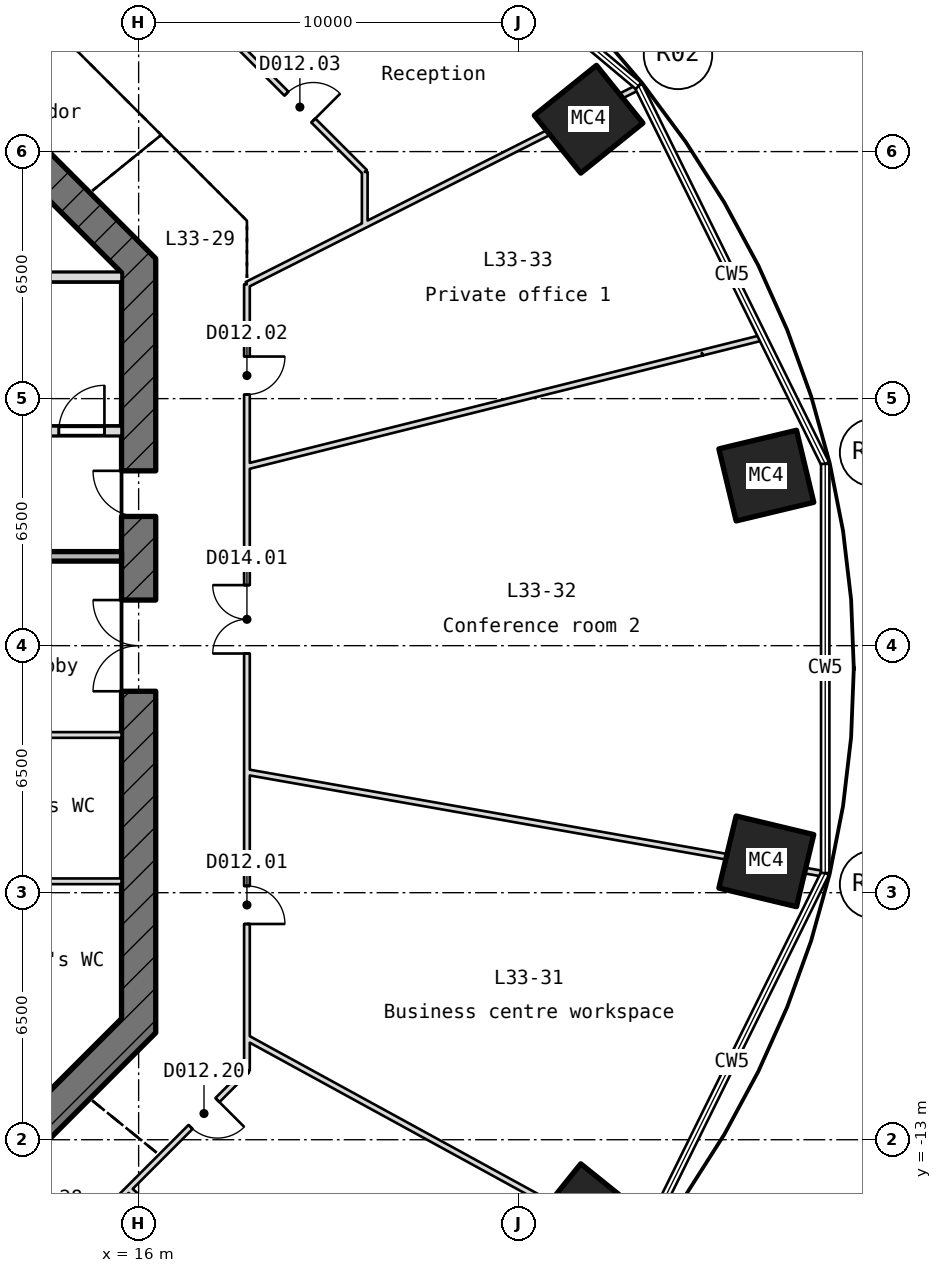
"""IFC4 building model, lengths in metres.
Left out: names, types, materials, properties, quantities, classifications, styles, units other than length and angle.
Written with IfcOpenShell. Run it as: python <this file> out.ifc"""

import sys

from ifc_helpers import new_model, si_unit, direction, frame, frame_2d, origin, origin_2d, place, context, subcontext, project, spatial, rectangle, hollow_rectangle, extrude, element, fill, save


model = new_model("IFC4")
c1 = context("Model", 3, precision=1e-05, world=origin(), true_north=direction((0.0, 1.0)))
c2 = subcontext(c1, "Body", "Model", "MODEL_VIEW")
j1 = project(units=[si_unit("LENGTHUNIT", "METRE"), si_unit("PLANEANGLEUNIT", "RADIAN")], contexts=[c1])
p1 = place(None, origin())
s1 = spatial("IfcSite", under=j1, at=p1, CompositionType="ELEMENT")
p2 = place(p1, origin())
s2 = spatial("IfcBuilding", under=s1, at=p2, CompositionType="ELEMENT")
p3 = place(p2, frame((0.0, 0.0, 155.65)))
s3 = spatial("IfcBuildingStorey", under=s2, at=p3, CompositionType="ELEMENT", Elevation=155.65)
for number, where, z_axis, x_axis in (
    (1, (32.517, 4.475, -0.25), (0.0, 0.0, 1.0), (0.233, -0.972, 0.0)),
    (2, (27.841, 13.852, -0.25), (0.0, 0.0, 1.0), (0.627, -0.779, 0.0)),
    (3, (27.841, -15.052, -0.25), (0.0, 0.0, 1.0), (-0.627, -0.779, 0.0)),
    (4, (32.517, -5.675, -0.25), (0.0, 0.0, 1.0), (-0.233, -0.972, 0.0)),
):
    element("IfcColumn", number, at=place(p3, frame(where, z_axis=z_axis, x_axis=x_axis)), inside=s3, PredefinedType="COLUMN", context=c2, shape_type="SweptSolid", body=[
        extrude(hollow_rectangle(XDim=1.95, YDim=2.1, WallThickness=0.075, at=origin_2d()), origin(), (0.0, 0.0, 1.0), 5.47),
    ])
p4 = place(p3, frame((12.868, -13.132, -0.25), z_axis=(0.0, 0.0, 1.0), x_axis=(0.707106781187, 0.707106781187, 0.0)))
e5 = element("IfcWall", 5, at=p4, inside=s3, PredefinedType="SHEAR", context=c2, shape_type="SweptSolid", body=[
    extrude(rectangle(XDim=4.615, YDim=0.9, at=frame_2d((2.308, 0.0))), origin(), (0.0, 0.0, 1.0), 5.47),
])
p5 = place(p3, frame((16.0, -10.186, -0.25), z_axis=(0.0, 0.0, 1.0), x_axis=(0.0, 1.0, 0.0)))
e6 = element("IfcWall", 6, at=p5, inside=s3, PredefinedType="SHEAR", context=c2, shape_type="SweptSolid", body=[
    extrude(rectangle(XDim=20.373, YDim=0.9, at=frame_2d((10.186, 0.0))), origin(), (0.0, 0.0, 1.0), 5.47),
])
p6 = place(p5, frame((8.986, 0.0, 0.25)))
e7 = element("IfcOpeningElement", 7, at=p6, cuts=e6, PredefinedType="OPENING", context=c2, shape_type="SweptSolid", body=[
    extrude(rectangle(XDim=2.4, YDim=2.1, at=frame_2d((1.2, 1.05))), frame((0.0, 0.46, 0.0), z_axis=(0.0, -1.0, 0.0), x_axis=(1.0, 0.0, 0.0)), (0.0, 0.0, 1.0), 0.92),
])
p7 = place(p5, frame((13.586, 0.0, 0.25)))
e8 = element("IfcOpeningElement", 8, at=p7, cuts=e6, PredefinedType="OPENING", context=c2, shape_type="SweptSolid", body=[
    extrude(rectangle(XDim=1.2, YDim=2.1, at=frame_2d((0.6, 1.05))), frame((0.0, 0.46, 0.0), z_axis=(0.0, -1.0, 0.0), x_axis=(1.0, 0.0, 0.0)), (0.0, 0.0, 1.0), 0.92),
])
p8 = place(p3, frame((16.132, 9.868, -0.25), z_axis=(0.0, 0.0, 1.0), x_axis=(-0.707106781187, 0.707106781187, 0.0)))
e9 = element("IfcWall", 9, at=p8, inside=s3, PredefinedType="SHEAR", context=c2, shape_type="SweptSolid", body=[
    extrude(rectangle(XDim=4.615, YDim=0.9, at=frame_2d((2.308, 0.0))), origin(), (0.0, 0.0, 1.0), 5.47),
])
p9 = place(p3, frame((10.975, -6.2, 0.0), z_axis=(0.0, 0.0, 1.0), x_axis=(1.0, 0.0, 0.0)))
e10 = element("IfcWall", 10, at=p9, inside=s3, PredefinedType="PARTITIONING", context=c2, shape_type="SweptSolid", body=[
    extrude(rectangle(XDim=4.575, YDim=0.15, at=frame_2d((2.288, 0.0))), origin(), (0.0, 0.0, 1.0), 5.22),
])
p10 = place(p3, frame((8.4, -2.35, 0.0), z_axis=(0.0, 0.0, 1.0), x_axis=(1.0, 0.0, 0.0)))
e11 = element("IfcWall", 11, at=p10, inside=s3, PredefinedType="PARTITIONING", context=c2, shape_type="SweptSolid", body=[
    extrude(rectangle(XDim=7.15, YDim=0.15, at=frame_2d((3.575, 0.0))), origin(), (0.0, 0.0, 1.0), 5.22),
])
p11 = place(p3, frame((8.4, 2.35, 0.0), z_axis=(0.0, 0.0, 1.0), x_axis=(1.0, 0.0, 0.0)))
e12 = element("IfcWall", 12, at=p11, inside=s3, PredefinedType="STANDARD", context=c2, shape_type="SweptSolid", body=[
    extrude(rectangle(XDim=7.15, YDim=0.25, at=frame_2d((3.575, 0.0))), origin(), (0.0, 0.0, 1.0), 5.22),
])
p12 = place(p3, frame((8.55, 5.65, -0.25), z_axis=(0.0, 0.0, 1.0), x_axis=(1.0, 0.0, 0.0)))
e13 = element("IfcWall", 13, at=p12, inside=s3, PredefinedType="SHEAR", context=c2, shape_type="SweptSolid", body=[
    extrude(rectangle(XDim=7.0, YDim=0.25, at=frame_2d((3.5, 0.0))), origin(), (0.0, 0.0, 1.0), 5.47),
])
p13 = place(p12, frame((5.35, 0.0, 0.25)))
e14 = element("IfcOpeningElement", 14, at=p13, cuts=e13, PredefinedType="OPENING", context=c2, shape_type="SweptSolid", body=[
    extrude(rectangle(XDim=1.2, YDim=2.1, at=frame_2d((0.6, 1.05))), frame((0.0, 0.135, 0.0), z_axis=(0.0, -1.0, 0.0), x_axis=(1.0, 0.0, 0.0)), (0.0, 0.0, 1.0), 0.27),
])
p14 = place(p3, frame((8.55, 9.7, -0.25), z_axis=(0.0, 0.0, 1.0), x_axis=(1.0, 0.0, 0.0)))
e15 = element("IfcWall", 15, at=p14, inside=s3, PredefinedType="SHEAR", context=c2, shape_type="SweptSolid", body=[
    extrude(rectangle(XDim=7.0, YDim=0.25, at=frame_2d((3.5, 0.0))), origin(), (0.0, 0.0, 1.0), 5.47),
])
p15 = place(p3, frame((18.85, 4.713, 0.0), z_axis=(0.0, 0.0, 1.0), x_axis=(0.970133188506, 0.242572868557, 0.0)))
e16 = element("IfcWall", 16, at=p15, inside=s3, PredefinedType="PARTITIONING", context=c2, shape_type="SweptSolid", body=[
    extrude(rectangle(XDim=12.339, YDim=0.15, at=frame_2d((6.17, 0.0))), origin(), (0.0, 0.0, 1.0), 4.608),
])
p16 = place(p3, frame((30.821, 7.706, 0.0), z_axis=(0.0, 0.0, 1.0), x_axis=(0.97015129404, 0.242500446746, 0.0)))
e17 = element("IfcWall", 17, at=p16, inside=s3, PredefinedType="PARTITIONING", context=c2, shape_type="SweptSolid", body=[
    extrude(rectangle(XDim=1.633, YDim=0.15, at=frame_2d((0.816, 0.0))), origin(), (0.0, 0.0, 1.0), 5.22),
])
p17 = place(p3, frame((18.85, 9.502, 0.0), z_axis=(0.0, 0.0, 1.0), x_axis=(0.892969898895, 0.450116384579, 0.0)))
e18 = element("IfcWall", 18, at=p17, inside=s3, PredefinedType="PARTITIONING", context=c2, shape_type="SweptSolid", body=[
    extrude(rectangle(XDim=9.412, YDim=0.15, at=frame_2d((4.706, 0.0))), origin(), (0.0, 0.0, 1.0), 4.608),
])
p18 = place(p3, frame((27.255, 13.738, 0.0), z_axis=(0.0, 0.0, 1.0), x_axis=(0.892996055484, 0.4500644897, 0.0)))
e19 = element("IfcWall", 19, at=p18, inside=s3, PredefinedType="PARTITIONING", context=c2, shape_type="SweptSolid", body=[
    extrude(rectangle(XDim=2.122, YDim=0.15, at=frame_2d((1.061, 0.0))), origin(), (0.0, 0.0, 1.0), 5.22),
])
p19 = place(p3, frame((14.18, -15.85, 0.0), z_axis=(0.0, 0.0, 1.0), x_axis=(0.707106781187, 0.707106781187, 0.0)))
e20 = element("IfcWall", 20, at=p19, inside=s3, PredefinedType="PARTITIONING", context=c2, shape_type="SweptSolid", body=[
    extrude(rectangle(XDim=6.604, YDim=0.15, at=frame_2d((3.302, 0.0))), origin(), (0.0, 0.0, 1.0), 5.22),
])
p20 = place(p19, frame((4.506, 0.0, 0.0)))
e21 = element("IfcOpeningElement", 21, at=p20, cuts=e20, PredefinedType="OPENING", context=c2, shape_type="SweptSolid", body=[
    extrude(rectangle(XDim=1.0, YDim=2.1, at=frame_2d((0.5, 1.05))), frame((0.0, 0.085, 0.0), z_axis=(0.0, -1.0, 0.0), x_axis=(1.0, 0.0, 0.0)), (0.0, 0.0, 1.0), 0.17),
])
p21 = place(p3, frame((21.95, 11.064, 0.0), z_axis=(0.0, 0.0, 1.0), x_axis=(0.0, 1.0, 0.0)))
e22 = element("IfcWall", 22, at=p21, inside=s3, PredefinedType="PARTITIONING", context=c2, shape_type="SweptSolid", body=[
    extrude(rectangle(XDim=1.4, YDim=0.15, at=frame_2d((0.7, 0.0))), origin(), (0.0, 0.0, 1.0), 5.22),
])
p22 = place(p3, frame((18.85, -11.18, 0.0), z_axis=(0.0, 0.0, 1.0), x_axis=(0.0, 1.0, 0.0)))
e23 = element("IfcWall", 23, at=p22, inside=s3, PredefinedType="PARTITIONING", context=c2, shape_type="SweptSolid", body=[
    extrude(rectangle(XDim=20.688, YDim=0.15, at=frame_2d((10.344, 0.0))), origin(), (0.0, 0.0, 1.0), 5.22),
])
p23 = place(p22, frame((3.857, 0.0, 0.0)))
e24 = element("IfcOpeningElement", 24, at=p23, cuts=e23, PredefinedType="OPENING", context=c2, shape_type="SweptSolid", body=[
    extrude(rectangle(XDim=1.0, YDim=2.1, at=frame_2d((0.5, 1.05))), frame((0.0, 0.085, 0.0), z_axis=(0.0, -1.0, 0.0), x_axis=(1.0, 0.0, 0.0)), (0.0, 0.0, 1.0), 0.17),
])
p24 = place(p22, frame((10.974, 0.0, 0.0)))
e25 = element("IfcOpeningElement", 25, at=p24, cuts=e23, PredefinedType="OPENING", context=c2, shape_type="SweptSolid", body=[
    extrude(rectangle(XDim=1.8, YDim=2.1, at=frame_2d((0.9, 1.05))), frame((0.0, 0.085, 0.0), z_axis=(0.0, -1.0, 0.0), x_axis=(1.0, 0.0, 0.0)), (0.0, 0.0, 1.0), 0.17),
])
p25 = place(p22, frame((17.788, 0.0, 0.0)))
e26 = element("IfcOpeningElement", 26, at=p25, cuts=e23, PredefinedType="OPENING", context=c2, shape_type="SweptSolid", body=[
    extrude(rectangle(XDim=1.0, YDim=2.1, at=frame_2d((0.5, 1.05))), frame((0.0, 0.085, 0.0), z_axis=(0.0, -1.0, 0.0), x_axis=(1.0, 0.0, 0.0)), (0.0, 0.0, 1.0), 0.17),
])
p26 = place(p3, frame((21.95, 12.465, 0.0), z_axis=(0.0, 0.0, 1.0), x_axis=(-0.707106781187, 0.707106781187, 0.0)))
e27 = element("IfcWall", 27, at=p26, inside=s3, PredefinedType="PARTITIONING", context=c2, shape_type="SweptSolid", body=[
    extrude(rectangle(XDim=9.172, YDim=0.15, at=frame_2d((4.586, 0.0))), origin(), (0.0, 0.0, 1.0), 5.22),
])
p27 = place(p26, frame((1.914, 0.0, 0.0)))
e28 = element("IfcOpeningElement", 28, at=p27, cuts=e27, PredefinedType="OPENING", context=c2, shape_type="SweptSolid", body=[
    extrude(rectangle(XDim=1.0, YDim=2.1, at=frame_2d((0.5, 1.05))), frame((0.0, 0.085, 0.0), z_axis=(0.0, -1.0, 0.0), x_axis=(1.0, 0.0, 0.0)), (0.0, 0.0, 1.0), 0.17),
])
p28 = place(p26, frame((6.5, 0.0, 0.0)))
e29 = element("IfcOpeningElement", 29, at=p28, cuts=e27, PredefinedType="OPENING", context=c2, shape_type="SweptSolid", body=[
    extrude(rectangle(XDim=1.0, YDim=2.1, at=frame_2d((0.5, 1.05))), frame((0.0, 0.085, 0.0), z_axis=(0.0, -1.0, 0.0), x_axis=(1.0, 0.0, 0.0)), (0.0, 0.0, 1.0), 0.17),
])
p29 = place(p3, frame((23.096, -20.984, 0.0), z_axis=(0.0, 0.0, 1.0), x_axis=(-0.740122200338, 0.672472399856, 0.0)))
e30 = element("IfcWall", 30, at=p29, inside=s3, PredefinedType="PARTITIONING", context=c2, shape_type="SweptSolid", body=[
    extrude(rectangle(XDim=9.946, YDim=0.15, at=frame_2d((4.973, 0.0))), origin(), (0.0, 0.0, 1.0), 5.22),
])
p30 = place(p3, frame((27.263, -14.926, 0.0), z_axis=(0.0, 0.0, 1.0), x_axis=(-0.877149368701, 0.480217643352, 0.0)))
e31 = element("IfcWall", 31, at=p30, inside=s3, PredefinedType="PARTITIONING", context=c2, shape_type="SweptSolid", body=[
    extrude(rectangle(XDim=9.591, YDim=0.15, at=frame_2d((4.796, 0.0))), origin(), (0.0, 0.0, 1.0), 4.608),
])
p31 = place(p3, frame((34.033, -6.006, 0.0), z_axis=(0.0, 0.0, 1.0), x_axis=(-0.984792910243, 0.173732334166, 0.0)))
e32 = element("IfcWall", 32, at=p31, inside=s3, PredefinedType="PARTITIONING", context=c2, shape_type="SweptSolid", body=[
    extrude(rectangle(XDim=2.102, YDim=0.15, at=frame_2d((1.051, 0.0))), origin(), (0.0, 0.0, 1.0), 5.22),
])
p32 = place(p3, frame((31.963, -5.641, 0.0), z_axis=(0.0, 0.0, 1.0), x_axis=(-0.984781159157, 0.17379893144, 0.0)))
e33 = element("IfcWall", 33, at=p32, inside=s3, PredefinedType="PARTITIONING", context=c2, shape_type="SweptSolid", body=[
    extrude(rectangle(XDim=13.315, YDim=0.15, at=frame_2d((6.658, 0.0))), origin(), (0.0, 0.0, 1.0), 4.527),
])
p33 = place(p13, origin())
e34 = element("IfcDoor", 34, at=p33, inside=s3, OperationType="SINGLE_SWING_RIGHT", PredefinedType="DOOR", context=c2, shape_type="SweptSolid", body=[
    extrude(rectangle(XDim=1.2, YDim=2.1, at=frame_2d((0.6, 1.05))), frame((0.0, 0.025, 0.0), z_axis=(0.0, -1.0, 0.0), x_axis=(1.0, 0.0, 0.0)), (0.0, 0.0, 1.0), 0.05),
])
fill(e14, e34)
p34 = place(p6, origin())
e35 = element("IfcDoor", 35, at=p34, inside=s3, OperationType="DOUBLE_DOOR_SINGLE_SWING", PredefinedType="DOOR", context=c2, shape_type="SweptSolid", body=[
    extrude(rectangle(XDim=2.4, YDim=2.1, at=frame_2d((1.2, 1.05))), frame((0.0, 0.025, 0.0), z_axis=(0.0, -1.0, 0.0), x_axis=(1.0, 0.0, 0.0)), (0.0, 0.0, 1.0), 0.05),
])
fill(e7, e35)
p35 = place(p7, origin())
e36 = element("IfcDoor", 36, at=p35, inside=s3, OperationType="SINGLE_SWING_RIGHT", PredefinedType="DOOR", context=c2, shape_type="SweptSolid", body=[
    extrude(rectangle(XDim=1.2, YDim=2.1, at=frame_2d((0.6, 1.05))), frame((0.0, 0.025, 0.0), z_axis=(0.0, -1.0, 0.0), x_axis=(1.0, 0.0, 0.0)), (0.0, 0.0, 1.0), 0.05),
])
fill(e8, e36)
p36 = place(p23, frame((1.0, 0.0, 0.0), z_axis=(0.0, 0.0, 1.0), x_axis=(-1.0, 0.0, 0.0)))
e37 = element("IfcDoor", 37, at=p36, inside=s3, OperationType="SINGLE_SWING_LEFT", PredefinedType="DOOR", context=c2, shape_type="SweptSolid", body=[
    extrude(rectangle(XDim=1.0, YDim=2.1, at=frame_2d((0.5, 1.05))), frame((0.0, 0.025, 0.0), z_axis=(0.0, -1.0, 0.0), x_axis=(1.0, 0.0, 0.0)), (0.0, 0.0, 1.0), 0.05),
])
fill(e24, e37)
p37 = place(p24, origin())
e38 = element("IfcDoor", 38, at=p37, inside=s3, OperationType="DOUBLE_DOOR_SINGLE_SWING", PredefinedType="DOOR", context=c2, shape_type="SweptSolid", body=[
    extrude(rectangle(XDim=1.8, YDim=2.1, at=frame_2d((0.9, 1.05))), frame((0.0, 0.025, 0.0), z_axis=(0.0, -1.0, 0.0), x_axis=(1.0, 0.0, 0.0)), (0.0, 0.0, 1.0), 0.05),
])
fill(e25, e38)
p38 = place(p25, frame((1.0, 0.0, 0.0), z_axis=(0.0, 0.0, 1.0), x_axis=(-1.0, 0.0, 0.0)))
e39 = element("IfcDoor", 39, at=p38, inside=s3, OperationType="SINGLE_SWING_LEFT", PredefinedType="DOOR", context=c2, shape_type="SweptSolid", body=[
    extrude(rectangle(XDim=1.0, YDim=2.1, at=frame_2d((0.5, 1.05))), frame((0.0, 0.025, 0.0), z_axis=(0.0, -1.0, 0.0), x_axis=(1.0, 0.0, 0.0)), (0.0, 0.0, 1.0), 0.05),
])
fill(e26, e39)
p39 = place(p27, frame((1.0, 0.0, 0.0), z_axis=(0.0, 0.0, 1.0), x_axis=(-1.0, 0.0, 0.0)))
e40 = element("IfcDoor", 40, at=p39, inside=s3, OperationType="SINGLE_SWING_LEFT", PredefinedType="DOOR", context=c2, shape_type="SweptSolid", body=[
    extrude(rectangle(XDim=1.0, YDim=2.1, at=frame_2d((0.5, 1.05))), frame((0.0, 0.025, 0.0), z_axis=(0.0, -1.0, 0.0), x_axis=(1.0, 0.0, 0.0)), (0.0, 0.0, 1.0), 0.05),
])
fill(e28, e40)
p40 = place(p20, frame((1.0, 0.0, 0.0), z_axis=(0.0, 0.0, 1.0), x_axis=(-1.0, 0.0, 0.0)))
e41 = element("IfcDoor", 41, at=p40, inside=s3, OperationType="SINGLE_SWING_LEFT", PredefinedType="DOOR", context=c2, shape_type="SweptSolid", body=[
    extrude(rectangle(XDim=1.0, YDim=2.1, at=frame_2d((0.5, 1.05))), frame((0.0, 0.025, 0.0), z_axis=(0.0, -1.0, 0.0), x_axis=(1.0, 0.0, 0.0)), (0.0, 0.0, 1.0), 0.05),
])
fill(e21, e41)
save(model, sys.argv[1])
